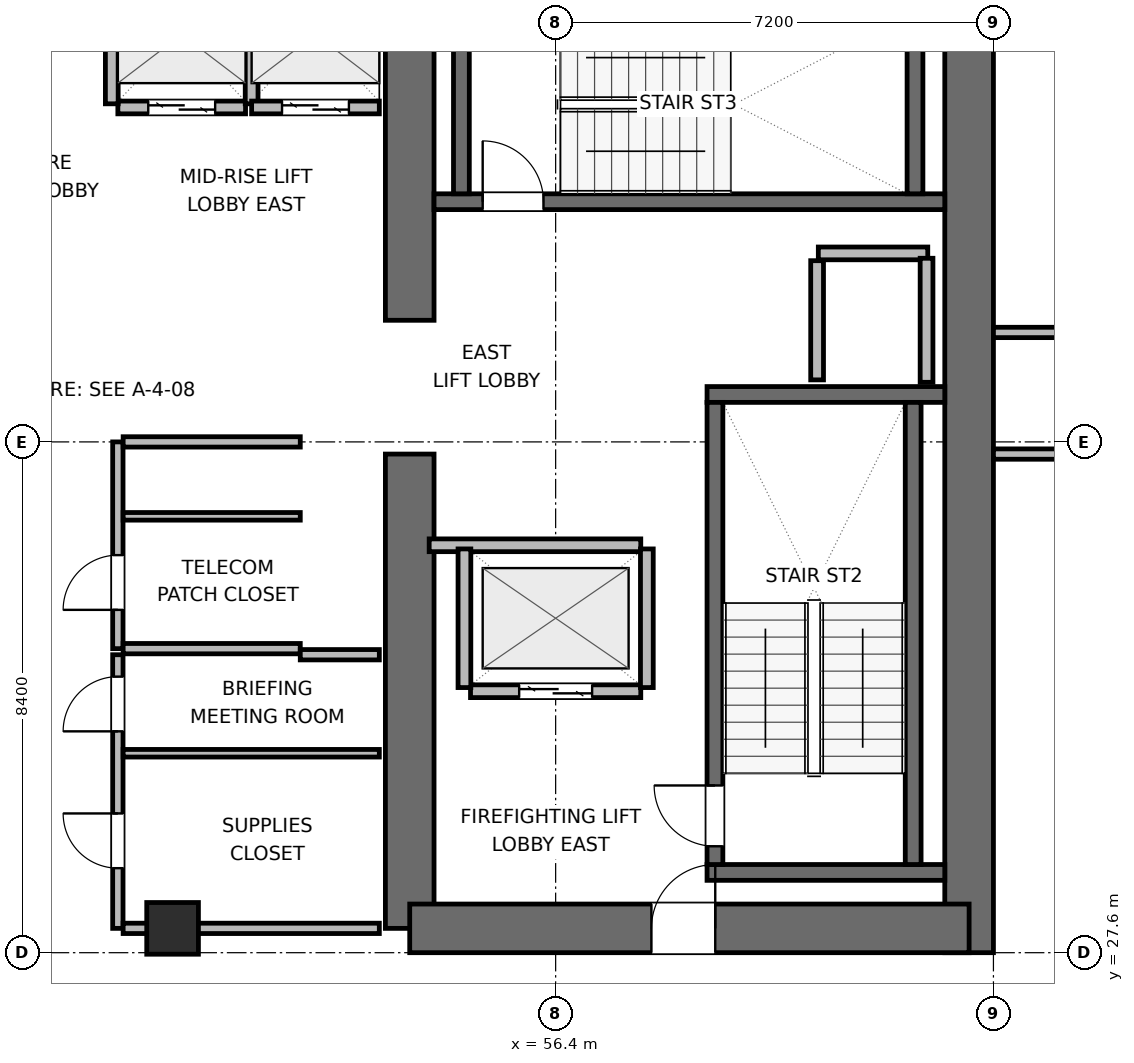
"""IFC4 building model, lengths in metres.
Left out: names, types, materials, properties, quantities, classifications, styles, units other than length and angle.
Written with IfcOpenShell. Run it as: python <this file> out.ifc"""

import sys

from ifc_helpers import new_model, si_unit, direction, frame, frame_2d, origin, origin_2d, place, context, subcontext, project, spatial, rectangle, extrude, element, fill, save


model = new_model("IFC4")
c1 = context("Model", 3, precision=1e-05, world=origin(), true_north=direction((0.0, 1.0)))
c2 = subcontext(c1, "Body", "Model", "MODEL_VIEW")
j1 = project(units=[si_unit("LENGTHUNIT", "METRE"), si_unit("PLANEANGLEUNIT", "RADIAN")], contexts=[c1])
p1 = place(None, origin())
s1 = spatial("IfcSite", under=j1, at=p1, CompositionType="ELEMENT")
p2 = place(p1, origin())
s2 = spatial("IfcBuilding", under=s1, at=p2, CompositionType="ELEMENT")
p3 = place(p2, frame((0.0, 0.0, 170.1)))
s3 = spatial("IfcBuildingStorey", under=s2, at=p3, CompositionType="ELEMENT", Elevation=170.1)
p4 = place(p3, frame((54.0, 28.0, 0.0), z_axis=(0.0, 0.0, 1.0), x_axis=(0.0, 1.0, 0.0)))
e1 = element("IfcWall", 1, at=p4, inside=s3, PredefinedType="SHEAR", context=c2, shape_type="SweptSolid", body=[
    extrude(rectangle(XDim=7.8, YDim=0.8, at=frame_2d((3.9, 0.0))), origin(), (0.0, 0.0, 1.0), 3.9),
])
p5 = place(p3, frame((54.0, 38.0, 0.0), z_axis=(0.0, 0.0, 1.0), x_axis=(0.0, 1.0, 0.0)))
e2 = element("IfcWall", 2, at=p5, inside=s3, PredefinedType="SHEAR", context=c2, shape_type="SweptSolid", body=[
    extrude(rectangle(XDim=6.0, YDim=0.8, at=frame_2d((3.0, 0.0))), origin(), (0.0, 0.0, 1.0), 3.9),
])
p6 = place(p3, frame((63.2, 27.6, 0.0), z_axis=(0.0, 0.0, 1.0), x_axis=(0.0, 1.0, 0.0)))
e3 = element("IfcWall", 3, at=p6, inside=s3, PredefinedType="SHEAR", context=c2, shape_type="SweptSolid", body=[
    extrude(rectangle(XDim=16.8, YDim=0.8, at=frame_2d((8.4, 0.0))), origin(), (0.0, 0.0, 1.0), 3.9),
])
p7 = place(p3, frame((54.0, 28.0, 0.0), z_axis=(0.0, 0.0, 1.0), x_axis=(1.0, 0.0, 0.0)))
e4 = element("IfcWall", 4, at=p7, inside=s3, PredefinedType="SHEAR", context=c2, shape_type="SweptSolid", body=[
    extrude(rectangle(XDim=9.2, YDim=0.8, at=frame_2d((4.6, 0.0))), origin(), (0.0, 0.0, 1.0), 3.9),
])
p8 = place(p7, frame((3.975, 0.0, 0.0)))
e5 = element("IfcOpeningElement", 5, at=p8, cuts=e4, PredefinedType="OPENING", context=c2, shape_type="SweptSolid", body=[
    extrude(rectangle(XDim=1.05, YDim=2.04, at=frame_2d((0.525, 1.02))), frame((0.0, 0.41, 0.0), z_axis=(0.0, -1.0, 0.0), x_axis=(1.0, 0.0, 0.0)), (0.0, 0.0, 1.0), 0.82),
])
for number, where, z_axis, x_axis in (
    (6, (58.89, 28.92, 0.0), (0.0, 0.0, 1.0), (1.0, 0.0, 0.0)),
    (7, (58.89, 36.78, 0.0), (0.0, 0.0, 1.0), (1.0, 0.0, 0.0)),
):
    element("IfcWall", number, at=place(p3, frame(where, z_axis=z_axis, x_axis=x_axis)), inside=s3, PredefinedType="SHEAR", context=c2, shape_type="SweptSolid", body=[
        extrude(rectangle(XDim=3.91, YDim=0.26, at=frame_2d((1.955, 0.0))), origin(), (0.0, 0.0, 1.0), 3.9),
    ])
p9 = place(p3, frame((59.02, 29.05, 0.0), z_axis=(0.0, 0.0, 1.0), x_axis=(0.0, 1.0, 0.0)))
e8 = element("IfcWall", 8, at=p9, inside=s3, PredefinedType="SHEAR", context=c2, shape_type="SweptSolid", body=[
    extrude(rectangle(XDim=7.6, YDim=0.26, at=frame_2d((3.8, 0.0))), origin(), (0.0, 0.0, 1.0), 3.9),
])
p10 = place(p9, frame((0.3, 0.0, 0.0)))
e9 = element("IfcOpeningElement", 9, at=p10, cuts=e8, PredefinedType="OPENING", context=c2, shape_type="SweptSolid", body=[
    extrude(rectangle(XDim=1.0, YDim=2.04, at=frame_2d((0.5, 1.02))), frame((0.0, 0.14, 0.0), z_axis=(0.0, -1.0, 0.0), x_axis=(1.0, 0.0, 0.0)), (0.0, 0.0, 1.0), 0.28),
])
p11 = place(p3, frame((62.28, 29.05, 0.0), z_axis=(0.0, 0.0, 1.0), x_axis=(0.0, 1.0, 0.0)))
e10 = element("IfcWall", 10, at=p11, inside=s3, PredefinedType="SHEAR", context=c2, shape_type="SweptSolid", body=[
    extrude(rectangle(XDim=7.6, YDim=0.26, at=frame_2d((3.8, 0.0))), origin(), (0.0, 0.0, 1.0), 3.9),
])
p12 = place(p3, frame((54.4, 39.95, 0.0), z_axis=(0.0, 0.0, 1.0), x_axis=(1.0, 0.0, 0.0)))
e11 = element("IfcWall", 11, at=p12, inside=s3, PredefinedType="SHEAR", context=c2, shape_type="SweptSolid", body=[
    extrude(rectangle(XDim=8.4, YDim=0.26, at=frame_2d((4.2, 0.0))), origin(), (0.0, 0.0, 1.0), 3.9),
])
p13 = place(p12, frame((0.8, 0.0, 0.0)))
e12 = element("IfcOpeningElement", 12, at=p13, cuts=e11, PredefinedType="OPENING", context=c2, shape_type="SweptSolid", body=[
    extrude(rectangle(XDim=1.0, YDim=2.04, at=frame_2d((0.5, 1.02))), frame((0.0, 0.14, 0.0), z_axis=(0.0, -1.0, 0.0), x_axis=(1.0, 0.0, 0.0)), (0.0, 0.0, 1.0), 0.28),
])
for number, where, z_axis, x_axis in (
    (13, (54.85, 40.08, 0.0), (0.0, 0.0, 1.0), (0.0, 1.0, 0.0)),
    (14, (62.31, 40.08, 0.0), (0.0, 0.0, 1.0), (0.0, 1.0, 0.0)),
):
    element("IfcWall", number, at=place(p3, frame(where, z_axis=z_axis, x_axis=x_axis)), inside=s3, PredefinedType="SHEAR", context=c2, shape_type="SweptSolid", body=[
        extrude(rectangle(XDim=2.94, YDim=0.26, at=frame_2d((1.47, 0.0))), origin(), (0.0, 0.0, 1.0), 3.9),
    ])
p14 = place(p3, frame((50.1, 28.0, 0.0), z_axis=(0.0, 0.0, 1.0), x_axis=(1.0, 0.0, 0.0)))
e15 = element("IfcColumn", 15, at=p14, inside=s3, PredefinedType="COLUMN", context=c2, shape_type="SweptSolid", body=[
    extrude(rectangle(XDim=0.85, YDim=0.85, at=origin_2d()), origin(), (0.0, 0.0, 1.0), 3.9),
])
p15 = place(p3, frame((60.72, 39.1, 0.0), z_axis=(0.0, 0.0, 1.0), x_axis=(1.0, 0.0, 0.0)))
e16 = element("IfcWall", 16, at=p15, inside=s3, PredefinedType="PARTITIONING", context=c2, shape_type="SweptSolid", body=[
    extrude(rectangle(XDim=1.8, YDim=0.21, at=frame_2d((0.9, 0.0))), origin(), (0.0, 0.0, 1.0), 3.68),
])
p16 = place(p3, frame((60.7, 37.02, 0.0), z_axis=(0.0, 0.0, 1.0), x_axis=(0.0, 1.0, 0.0)))
e17 = element("IfcWall", 17, at=p16, inside=s3, PredefinedType="PARTITIONING", context=c2, shape_type="SweptSolid", body=[
    extrude(rectangle(XDim=1.96, YDim=0.21, at=frame_2d((0.98, 0.0))), origin(), (0.0, 0.0, 1.0), 3.68),
])
p17 = place(p3, frame((62.5, 36.98, 0.0), z_axis=(0.0, 0.0, 1.0), x_axis=(0.0, 1.0, 0.0)))
e18 = element("IfcWall", 18, at=p17, inside=s3, PredefinedType="PARTITIONING", context=c2, shape_type="SweptSolid", body=[
    extrude(rectangle(XDim=2.04, YDim=0.21, at=frame_2d((1.02, 0.0))), origin(), (0.0, 0.0, 1.0), 3.68),
])
p18 = place(p3, frame((55.0, 31.9, 0.0), z_axis=(0.0, 0.0, 1.0), x_axis=(1.0, 0.0, 0.0)))
e19 = element("IfcWall", 19, at=p18, inside=s3, PredefinedType="PARTITIONING", context=c2, shape_type="SweptSolid", body=[
    extrude(rectangle(XDim=2.8, YDim=0.21, at=frame_2d((1.4, 0.0))), origin(), (0.0, 0.0, 1.0), 3.68),
])
p19 = place(p18, frame((0.8, 0.0, 0.0)))
e20 = element("IfcOpeningElement", 20, at=p19, cuts=e19, PredefinedType="OPENING", context=c2, shape_type="SweptSolid", body=[
    extrude(rectangle(XDim=1.2, YDim=2.04, at=frame_2d((0.6, 1.02))), frame((0.0, 0.115, 0.0), z_axis=(0.0, -1.0, 0.0), x_axis=(1.0, 0.0, 0.0)), (0.0, 0.0, 1.0), 0.23),
])
p20 = place(p3, frame((54.32, 34.3, 0.0), z_axis=(0.0, 0.0, 1.0), x_axis=(1.0, 0.0, 0.0)))
e21 = element("IfcWall", 21, at=p20, inside=s3, PredefinedType="PARTITIONING", context=c2, shape_type="SweptSolid", body=[
    extrude(rectangle(XDim=3.48, YDim=0.21, at=frame_2d((1.74, 0.0))), origin(), (0.0, 0.0, 1.0), 3.68),
])
for number, where, z_axis, x_axis in (
    (22, (54.9, 31.96, 0.0), (0.0, 0.0, 1.0), (0.0, 1.0, 0.0)),
    (23, (57.9, 31.96, 0.0), (0.0, 0.0, 1.0), (0.0, 1.0, 0.0)),
):
    element("IfcWall", number, at=place(p3, frame(where, z_axis=z_axis, x_axis=x_axis)), inside=s3, PredefinedType="PARTITIONING", context=c2, shape_type="SweptSolid", body=[
        extrude(rectangle(XDim=2.28, YDim=0.21, at=frame_2d((1.14, 0.0))), origin(), (0.0, 0.0, 1.0), 3.68),
    ])
p21 = place(p3, frame((49.2, 41.5, 0.0), z_axis=(0.0, 0.0, 1.0), x_axis=(1.0, 0.0, 0.0)))
e24 = element("IfcWall", 24, at=p21, inside=s3, PredefinedType="PARTITIONING", context=c2, shape_type="SweptSolid", body=[
    extrude(rectangle(XDim=2.1, YDim=0.21, at=frame_2d((1.05, 0.0))), origin(), (0.0, 0.0, 1.0), 3.68),
])
p22 = place(p21, frame((0.5, 0.0, 0.0)))
e25 = element("IfcOpeningElement", 25, at=p22, cuts=e24, PredefinedType="OPENING", context=c2, shape_type="SweptSolid", body=[
    extrude(rectangle(XDim=1.1, YDim=2.04, at=frame_2d((0.55, 1.02))), frame((0.0, 0.115, 0.0), z_axis=(0.0, -1.0, 0.0), x_axis=(1.0, 0.0, 0.0)), (0.0, 0.0, 1.0), 0.23),
])
for number, where, z_axis, x_axis in (
    (26, (49.1, 41.56, 0.0), (0.0, 0.0, 1.0), (0.0, 1.0, 0.0)),
    (27, (51.4, 41.56, 0.0), (0.0, 0.0, 1.0), (0.0, 1.0, 0.0)),
):
    element("IfcWall", number, at=place(p3, frame(where, z_axis=z_axis, x_axis=x_axis)), inside=s3, PredefinedType="PARTITIONING", context=c2, shape_type="SweptSolid", body=[
        extrude(rectangle(XDim=2.28, YDim=0.21, at=frame_2d((1.14, 0.0))), origin(), (0.0, 0.0, 1.0), 3.68),
    ])
p23 = place(p3, frame((51.4, 41.5, 0.0), z_axis=(0.0, 0.0, 1.0), x_axis=(1.0, 0.0, 0.0)))
e28 = element("IfcWall", 28, at=p23, inside=s3, PredefinedType="PARTITIONING", context=c2, shape_type="SweptSolid", body=[
    extrude(rectangle(XDim=2.1, YDim=0.21, at=frame_2d((1.05, 0.0))), origin(), (0.0, 0.0, 1.0), 3.68),
])
p24 = place(p23, frame((0.5, 0.0, 0.0)))
e29 = element("IfcOpeningElement", 29, at=p24, cuts=e28, PredefinedType="OPENING", context=c2, shape_type="SweptSolid", body=[
    extrude(rectangle(XDim=1.1, YDim=2.04, at=frame_2d((0.55, 1.02))), frame((0.0, 0.115, 0.0), z_axis=(0.0, -1.0, 0.0), x_axis=(1.0, 0.0, 0.0)), (0.0, 0.0, 1.0), 0.23),
])
p25 = place(p3, frame((49.2, 32.6, 0.0), z_axis=(0.0, 0.0, 1.0), x_axis=(0.0, 1.0, 0.0)))
e30 = element("IfcWall", 30, at=p25, inside=s3, PredefinedType="PARTITIONING", context=c2, shape_type="SweptSolid", body=[
    extrude(rectangle(XDim=3.4, YDim=0.17, at=frame_2d((1.7, 0.0))), origin(), (0.0, 0.0, 1.0), 3.68),
])
p26 = place(p25, frame((0.638, 0.0, 0.0)))
e31 = element("IfcOpeningElement", 31, at=p26, cuts=e30, PredefinedType="OPENING", context=c2, shape_type="SweptSolid", body=[
    extrude(rectangle(XDim=0.9, YDim=2.02, at=frame_2d((0.45, 1.01))), frame((0.0, 0.095, 0.0), z_axis=(0.0, -1.0, 0.0), x_axis=(1.0, 0.0, 0.0)), (0.0, 0.0, 1.0), 0.19),
])
for number, where, z_axis, x_axis in (
    (32, (49.287, 32.6, 0.0), (0.0, 0.0, 1.0), (1.0, 0.0, 0.0)),
    (33, (49.287, 36.0, 0.0), (0.0, 0.0, 1.0), (1.0, 0.0, 0.0)),
):
    element("IfcWall", number, at=place(p3, frame(where, z_axis=z_axis, x_axis=x_axis)), inside=s3, PredefinedType="PARTITIONING", context=c2, shape_type="SweptSolid", body=[
        extrude(rectangle(XDim=2.913, YDim=0.17, at=frame_2d((1.457, 0.0))), origin(), (0.0, 0.0, 1.0), 3.68),
    ])
p27 = place(p3, frame((49.287, 34.776, 0.0), z_axis=(0.0, 0.0, 1.0), x_axis=(1.0, 0.0, 0.0)))
e34 = element("IfcWall", 34, at=p27, inside=s3, PredefinedType="PARTITIONING", context=c2, shape_type="SweptSolid", body=[
    extrude(rectangle(XDim=2.913, YDim=0.125, at=frame_2d((1.457, 0.0))), origin(), (0.0, 0.0, 1.0), 3.68),
])
p28 = place(p3, frame((49.2, 28.0, 0.0), z_axis=(0.0, 0.0, 1.0), x_axis=(0.0, 1.0, 0.0)))
e35 = element("IfcWall", 35, at=p28, inside=s3, PredefinedType="PARTITIONING", context=c2, shape_type="SweptSolid", body=[
    extrude(rectangle(XDim=4.5, YDim=0.17, at=frame_2d((2.25, 0.0))), origin(), (0.0, 0.0, 1.0), 3.68),
])
p29 = place(p28, frame((0.99, 0.0, 0.0)))
e36 = element("IfcOpeningElement", 36, at=p29, cuts=e35, PredefinedType="OPENING", context=c2, shape_type="SweptSolid", body=[
    extrude(rectangle(XDim=0.9, YDim=2.02, at=frame_2d((0.45, 1.01))), frame((0.0, 0.095, 0.0), z_axis=(0.0, -1.0, 0.0), x_axis=(1.0, 0.0, 0.0)), (0.0, 0.0, 1.0), 0.19),
])
p30 = place(p28, frame((3.24, 0.0, 0.0)))
e37 = element("IfcOpeningElement", 37, at=p30, cuts=e35, PredefinedType="OPENING", context=c2, shape_type="SweptSolid", body=[
    extrude(rectangle(XDim=0.9, YDim=2.02, at=frame_2d((0.45, 1.01))), frame((0.0, 0.095, 0.0), z_axis=(0.0, -1.0, 0.0), x_axis=(1.0, 0.0, 0.0)), (0.0, 0.0, 1.0), 0.19),
])
p31 = place(p3, frame((49.287, 28.0, 0.0), z_axis=(0.0, 0.0, 1.0), x_axis=(1.0, 0.0, 0.0)))
e38 = element("IfcWall", 38, at=p31, inside=s3, PredefinedType="PARTITIONING", context=c2, shape_type="SweptSolid", body=[
    extrude(rectangle(XDim=4.213, YDim=0.17, at=frame_2d((2.106, 0.0))), origin(), (0.0, 0.0, 1.0), 2.765),
])
p32 = place(p3, frame((52.2, 32.5, 0.0), z_axis=(0.0, 0.0, 1.0), x_axis=(1.0, 0.0, 0.0)))
e39 = element("IfcWall", 39, at=p32, inside=s3, PredefinedType="PARTITIONING", context=c2, shape_type="SweptSolid", body=[
    extrude(rectangle(XDim=1.3, YDim=0.17, at=frame_2d((0.65, 0.0))), origin(), (0.0, 0.0, 1.0), 3.68),
])
p33 = place(p3, frame((49.287, 30.88, 0.0), z_axis=(0.0, 0.0, 1.0), x_axis=(1.0, 0.0, 0.0)))
e40 = element("IfcWall", 40, at=p33, inside=s3, PredefinedType="PARTITIONING", context=c2, shape_type="SweptSolid", body=[
    extrude(rectangle(XDim=4.213, YDim=0.125, at=frame_2d((2.106, 0.0))), origin(), (0.0, 0.0, 1.0), 3.68),
])
p34 = place(p3, frame((63.6, 35.8, 0.0), z_axis=(0.0, 0.0, 1.0), x_axis=(1.0, 0.0, 0.0)))
e41 = element("IfcWall", 41, at=p34, inside=s3, PredefinedType="PARTITIONING", context=c2, shape_type="SweptSolid", body=[
    extrude(rectangle(XDim=6.975, YDim=0.17, at=frame_2d((3.487, 0.0))), origin(), (0.0, 0.0, 1.0), 3.043),
])
p35 = place(p34, frame((1.1, 0.0, 0.0)))
e42 = element("IfcOpeningElement", 42, at=p35, cuts=e41, PredefinedType="OPENING", context=c2, shape_type="SweptSolid", body=[
    extrude(rectangle(XDim=0.95, YDim=2.04, at=frame_2d((0.475, 1.02))), frame((0.0, 0.095, 0.0), z_axis=(0.0, -1.0, 0.0), x_axis=(1.0, 0.0, 0.0)), (0.0, 0.0, 1.0), 0.19),
])
p36 = place(p3, frame((63.6, 37.8, 0.0), z_axis=(0.0, 0.0, 1.0), x_axis=(1.0, 0.0, 0.0)))
e43 = element("IfcWall", 43, at=p36, inside=s3, PredefinedType="PARTITIONING", context=c2, shape_type="SweptSolid", body=[
    extrude(rectangle(XDim=4.96, YDim=0.17, at=frame_2d((2.48, 0.0))), origin(), (0.0, 0.0, 1.0), 3.68),
])
p37 = place(p36, frame((1.1, 0.0, 0.0)))
e44 = element("IfcOpeningElement", 44, at=p37, cuts=e43, PredefinedType="OPENING", context=c2, shape_type="SweptSolid", body=[
    extrude(rectangle(XDim=0.95, YDim=2.04, at=frame_2d((0.475, 1.02))), frame((0.0, 0.095, 0.0), z_axis=(0.0, -1.0, 0.0), x_axis=(1.0, 0.0, 0.0)), (0.0, 0.0, 1.0), 0.19),
])
p38 = place(p10, origin())
e45 = element("IfcDoor", 45, at=p38, inside=s3, OperationType="SINGLE_SWING_RIGHT", PredefinedType="DOOR", context=c2, shape_type="SweptSolid", body=[
    extrude(rectangle(XDim=1.0, YDim=2.04, at=frame_2d((0.5, 1.02))), frame((0.0, 0.025, 0.0), z_axis=(0.0, -1.0, 0.0), x_axis=(1.0, 0.0, 0.0)), (0.0, 0.0, 1.0), 0.05),
])
fill(e9, e45)
p39 = place(p13, origin())
e46 = element("IfcDoor", 46, at=p39, inside=s3, OperationType="SINGLE_SWING_LEFT", PredefinedType="DOOR", context=c2, shape_type="SweptSolid", body=[
    extrude(rectangle(XDim=1.0, YDim=2.04, at=frame_2d((0.5, 1.02))), frame((0.0, 0.025, 0.0), z_axis=(0.0, -1.0, 0.0), x_axis=(1.0, 0.0, 0.0)), (0.0, 0.0, 1.0), 0.05),
])
fill(e12, e46)
p40 = place(p19, origin())
e47 = element("IfcDoor", 47, at=p40, inside=s3, OperationType="DOUBLE_DOOR_SLIDING", PredefinedType="DOOR", context=c2, shape_type="SweptSolid", body=[
    extrude(rectangle(XDim=1.2, YDim=2.04, at=frame_2d((0.6, 1.02))), frame((0.0, 0.025, 0.0), z_axis=(0.0, -1.0, 0.0), x_axis=(1.0, 0.0, 0.0)), (0.0, 0.0, 1.0), 0.05),
])
fill(e20, e47)
p41 = place(p22, origin())
e48 = element("IfcDoor", 48, at=p41, inside=s3, OperationType="DOUBLE_DOOR_SLIDING", PredefinedType="DOOR", context=c2, shape_type="SweptSolid", body=[
    extrude(rectangle(XDim=1.1, YDim=2.04, at=frame_2d((0.55, 1.02))), frame((0.0, 0.025, 0.0), z_axis=(0.0, -1.0, 0.0), x_axis=(1.0, 0.0, 0.0)), (0.0, 0.0, 1.0), 0.05),
])
fill(e25, e48)
p42 = place(p24, origin())
e49 = element("IfcDoor", 49, at=p42, inside=s3, OperationType="DOUBLE_DOOR_SLIDING", PredefinedType="DOOR", context=c2, shape_type="SweptSolid", body=[
    extrude(rectangle(XDim=1.1, YDim=2.04, at=frame_2d((0.55, 1.02))), frame((0.0, 0.025, 0.0), z_axis=(0.0, -1.0, 0.0), x_axis=(1.0, 0.0, 0.0)), (0.0, 0.0, 1.0), 0.05),
])
fill(e29, e49)
p43 = place(p8, origin())
e50 = element("IfcDoor", 50, at=p43, inside=s3, OperationType="SINGLE_SWING_RIGHT", PredefinedType="DOOR", context=c2, shape_type="SweptSolid", body=[
    extrude(rectangle(XDim=1.05, YDim=2.04, at=frame_2d((0.525, 1.02))), frame((0.0, 0.025, 0.0), z_axis=(0.0, -1.0, 0.0), x_axis=(1.0, 0.0, 0.0)), (0.0, 0.0, 1.0), 0.05),
])
fill(e5, e50)
p44 = place(p26, origin())
e51 = element("IfcDoor", 51, at=p44, inside=s3, OperationType="SINGLE_SWING_LEFT", PredefinedType="DOOR", context=c2, shape_type="SweptSolid", body=[
    extrude(rectangle(XDim=0.9, YDim=2.02, at=frame_2d((0.45, 1.01))), frame((0.0, 0.025, 0.0), z_axis=(0.0, -1.0, 0.0), x_axis=(1.0, 0.0, 0.0)), (0.0, 0.0, 1.0), 0.05),
])
fill(e31, e51)
p45 = place(p29, origin())
e52 = element("IfcDoor", 52, at=p45, inside=s3, OperationType="SINGLE_SWING_RIGHT", PredefinedType="DOOR", context=c2, shape_type="SweptSolid", body=[
    extrude(rectangle(XDim=0.9, YDim=2.02, at=frame_2d((0.45, 1.01))), frame((0.0, 0.025, 0.0), z_axis=(0.0, -1.0, 0.0), x_axis=(1.0, 0.0, 0.0)), (0.0, 0.0, 1.0), 0.05),
])
fill(e36, e52)
p46 = place(p30, origin())
e53 = element("IfcDoor", 53, at=p46, inside=s3, OperationType="SINGLE_SWING_LEFT", PredefinedType="DOOR", context=c2, shape_type="SweptSolid", body=[
    extrude(rectangle(XDim=0.9, YDim=2.02, at=frame_2d((0.45, 1.01))), frame((0.0, 0.025, 0.0), z_axis=(0.0, -1.0, 0.0), x_axis=(1.0, 0.0, 0.0)), (0.0, 0.0, 1.0), 0.05),
])
fill(e37, e53)
save(model, sys.argv[1])
